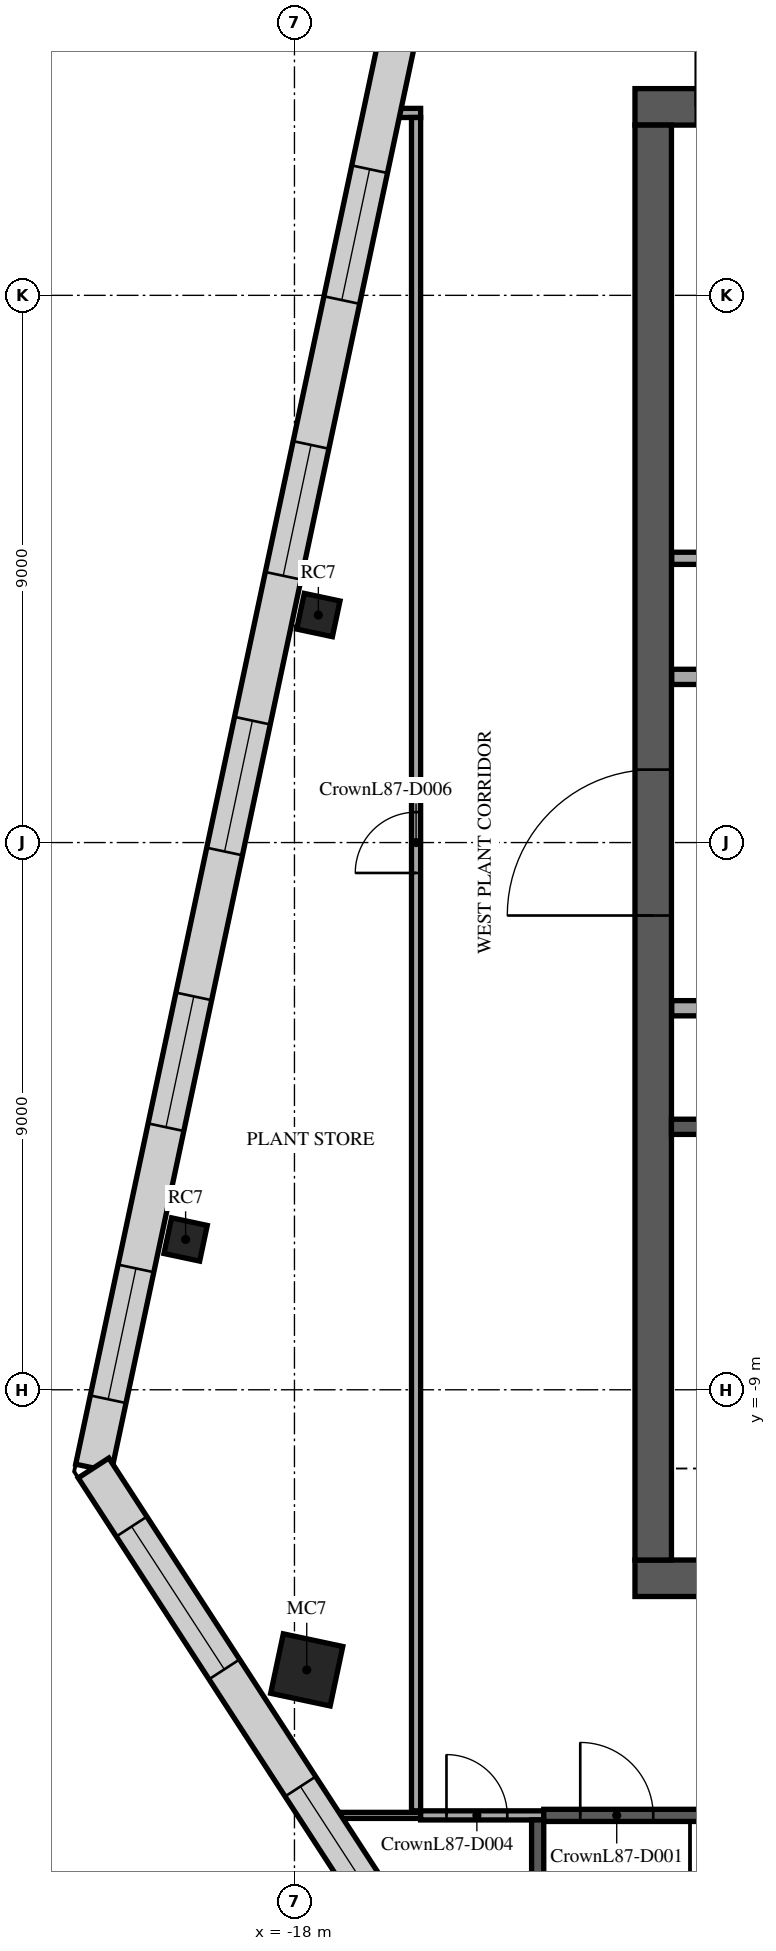
"""IFC4 building model, lengths in metres.
Left out: names, types, materials, properties, quantities, classifications, styles, units other than length and angle.
Written with IfcOpenShell. Run it as: python <this file> out.ifc"""

import sys

from ifc_helpers import new_model, si_unit, direction, frame, frame_2d, origin, origin_2d, place, context, subcontext, project, spatial, rectangle, extrude, element, fill, save


model = new_model("IFC4")
c1 = context("Model", 3, precision=1e-05, world=origin(), true_north=direction((0.0, 1.0)))
c2 = subcontext(c1, "Body", "Model", "MODEL_VIEW")
j1 = project(units=[si_unit("LENGTHUNIT", "METRE"), si_unit("PLANEANGLEUNIT", "RADIAN")], contexts=[c1])
p1 = place(None, origin())
s1 = spatial("IfcSite", under=j1, at=p1, CompositionType="ELEMENT")
p2 = place(p1, origin())
s2 = spatial("IfcBuilding", under=s1, at=p2, CompositionType="ELEMENT")
p3 = place(p2, frame((0.0, 0.0, 373.1)))
s3 = spatial("IfcBuildingStorey", under=s2, at=p3, CompositionType="ELEMENT", Elevation=373.1)
for number, where, z_axis, x_axis in (
    (1, (-17.607, 3.742, 0.0), (0.0, 0.0, 1.0), (0.208, 0.978, 0.0)),
    (2, (-19.79, -6.528, 0.0), (0.0, 0.0, 1.0), (0.208, 0.978, 0.0)),
):
    element("IfcColumn", number, at=place(p3, frame(where, z_axis=z_axis, x_axis=x_axis)), inside=s3, PredefinedType="COLUMN", context=c2, shape_type="SweptSolid", body=[
        extrude(rectangle(XDim=0.6, YDim=0.6, at=origin_2d()), origin(), (0.0, 0.0, 1.0), 3.5),
    ])
p4 = place(p3, frame((-17.798, -13.607, 0.0), z_axis=(0.0, 0.0, 1.0), x_axis=(0.207911690818, 0.978147600734, 0.0)))
e3 = element("IfcColumn", 3, at=p4, inside=s3, PredefinedType="COLUMN", context=c2, shape_type="SweptSolid", body=[
    extrude(rectangle(XDim=1.0, YDim=1.0, at=origin_2d()), origin(), (0.0, 0.0, 1.0), 3.5),
])
p5 = place(p3, frame((-12.4, 12.1, 0.0), z_axis=(0.0, 0.0, 1.0), x_axis=(1.0, 0.0, 0.0)))
e4 = element("IfcWall", 4, at=p5, inside=s3, PredefinedType="SHEAR", context=c2, shape_type="SweptSolid", body=[
    extrude(rectangle(XDim=24.8, YDim=0.6, at=frame_2d((12.4, 0.0))), origin(), (0.0, 0.0, 1.0), 3.2),
])
p6 = place(p5, frame((11.2, 0.0, 0.0)))
e5 = element("IfcOpeningElement", 5, at=p6, cuts=e4, PredefinedType="OPENING", context=c2, shape_type="SweptSolid", body=[
    extrude(rectangle(XDim=2.4, YDim=2.4, at=frame_2d((1.2, 1.2))), frame((0.0, 0.31, 0.0), z_axis=(0.0, -1.0, 0.0), x_axis=(1.0, 0.0, 0.0)), (0.0, 0.0, 1.0), 0.62),
])
p7 = place(p5, frame((22.025, 0.0, 0.0)))
e6 = element("IfcOpeningElement", 6, at=p7, cuts=e4, PredefinedType="OPENING", context=c2, shape_type="SweptSolid", body=[
    extrude(rectangle(XDim=1.2, YDim=2.1, at=frame_2d((0.6, 1.05))), frame((0.0, 0.31, 0.0), z_axis=(0.0, -1.0, 0.0), x_axis=(1.0, 0.0, 0.0)), (0.0, 0.0, 1.0), 0.62),
])
p8 = place(p5, frame((1.0, 0.0, 0.0)))
e7 = element("IfcOpeningElement", 7, at=p8, cuts=e4, PredefinedType="OPENING", context=c2, shape_type="SweptSolid", body=[
    extrude(rectangle(XDim=1.0, YDim=2.1, at=frame_2d((0.5, 1.05))), frame((0.0, 0.31, 0.0), z_axis=(0.0, -1.0, 0.0), x_axis=(1.0, 0.0, 0.0)), (0.0, 0.0, 1.0), 0.62),
])
p9 = place(p3, frame((-12.4, -12.1, 0.0), z_axis=(0.0, 0.0, 1.0), x_axis=(1.0, 0.0, 0.0)))
e8 = element("IfcWall", 8, at=p9, inside=s3, PredefinedType="SHEAR", context=c2, shape_type="SweptSolid", body=[
    extrude(rectangle(XDim=24.8, YDim=0.6, at=frame_2d((12.4, 0.0))), origin(), (0.0, 0.0, 1.0), 3.2),
])
p10 = place(p9, frame((7.3, 0.0, 0.0)))
e9 = element("IfcOpeningElement", 9, at=p10, cuts=e8, PredefinedType="OPENING", context=c2, shape_type="SweptSolid", body=[
    extrude(rectangle(XDim=2.0, YDim=2.1, at=frame_2d((1.0, 1.05))), frame((0.0, 0.31, 0.0), z_axis=(0.0, -1.0, 0.0), x_axis=(1.0, 0.0, 0.0)), (0.0, 0.0, 1.0), 0.62),
])
p11 = place(p9, frame((17.425, 0.0, 0.0)))
e10 = element("IfcOpeningElement", 10, at=p11, cuts=e8, PredefinedType="OPENING", context=c2, shape_type="SweptSolid", body=[
    extrude(rectangle(XDim=1.2, YDim=2.1, at=frame_2d((0.6, 1.05))), frame((0.0, 0.31, 0.0), z_axis=(0.0, -1.0, 0.0), x_axis=(1.0, 0.0, 0.0)), (0.0, 0.0, 1.0), 0.62),
])
p12 = place(p9, frame((1.575, 0.0, 0.0)))
e11 = element("IfcOpeningElement", 11, at=p12, cuts=e8, PredefinedType="OPENING", context=c2, shape_type="SweptSolid", body=[
    extrude(rectangle(XDim=1.2, YDim=2.1, at=frame_2d((0.6, 1.05))), frame((0.0, 0.31, 0.0), z_axis=(0.0, -1.0, 0.0), x_axis=(1.0, 0.0, 0.0)), (0.0, 0.0, 1.0), 0.62),
])
p13 = place(p9, frame((22.025, 0.0, 0.0)))
e12 = element("IfcOpeningElement", 12, at=p13, cuts=e8, PredefinedType="OPENING", context=c2, shape_type="SweptSolid", body=[
    extrude(rectangle(XDim=1.2, YDim=2.1, at=frame_2d((0.6, 1.05))), frame((0.0, 0.31, 0.0), z_axis=(0.0, -1.0, 0.0), x_axis=(1.0, 0.0, 0.0)), (0.0, 0.0, 1.0), 0.62),
])
p14 = place(p3, frame((-12.1, -11.8, 0.0), z_axis=(0.0, 0.0, 1.0), x_axis=(0.0, 1.0, 0.0)))
e13 = element("IfcWall", 13, at=p14, inside=s3, PredefinedType="SHEAR", context=c2, shape_type="SweptSolid", body=[
    extrude(rectangle(XDim=23.6, YDim=0.6, at=frame_2d((11.8, 0.0))), origin(), (0.0, 0.0, 1.0), 3.2),
])
p15 = place(p14, frame((10.6, 0.0, 0.0)))
e14 = element("IfcOpeningElement", 14, at=p15, cuts=e13, PredefinedType="OPENING", context=c2, shape_type="SweptSolid", body=[
    extrude(rectangle(XDim=2.4, YDim=2.4, at=frame_2d((1.2, 1.2))), frame((0.0, 0.31, 0.0), z_axis=(0.0, -1.0, 0.0), x_axis=(1.0, 0.0, 0.0)), (0.0, 0.0, 1.0), 0.62),
])
p16 = place(p3, frame((-8.65, -4.675, 0.0), z_axis=(0.0, 0.0, 1.0), x_axis=(-1.0, 0.0, 0.0)))
e15 = element("IfcWall", 15, at=p16, inside=s3, PredefinedType="SOLIDWALL", context=c2, shape_type="SweptSolid", body=[
    extrude(rectangle(XDim=3.15, YDim=0.25, at=frame_2d((1.575, 0.0))), origin(), (0.0, 0.0, 1.0), 3.2),
])
p17 = place(p3, frame((-11.795, -2.725, 0.0), z_axis=(0.0, 0.0, 1.0), x_axis=(1.0, 0.0, 0.0)))
e16 = element("IfcWall", 16, at=p17, inside=s3, PredefinedType="PARTITIONING", context=c2, shape_type="SweptSolid", body=[
    extrude(rectangle(XDim=14.415, YDim=0.25, at=frame_2d((7.208, 0.0))), origin(), (0.0, 0.0, 1.0), 3.2),
])
p18 = place(p17, frame((1.295, 0.0, 0.0)))
e17 = element("IfcOpeningElement", 17, at=p18, cuts=e16, PredefinedType="OPENING", context=c2, shape_type="SweptSolid", body=[
    extrude(rectangle(XDim=1.0, YDim=2.1, at=frame_2d((0.5, 1.05))), frame((0.0, 0.135, 0.0), z_axis=(0.0, -1.0, 0.0), x_axis=(1.0, 0.0, 0.0)), (0.0, 0.0, 1.0), 0.27),
])
p19 = place(p17, frame((4.42, 0.0, 0.0)))
e18 = element("IfcOpeningElement", 18, at=p19, cuts=e16, PredefinedType="OPENING", context=c2, shape_type="SweptSolid", body=[
    extrude(rectangle(XDim=1.0, YDim=2.1, at=frame_2d((0.5, 1.05))), frame((0.0, 0.135, 0.0), z_axis=(0.0, -1.0, 0.0), x_axis=(1.0, 0.0, 0.0)), (0.0, 0.0, 1.0), 0.27),
])
p20 = place(p17, frame((9.92, 0.0, 0.0)))
e19 = element("IfcOpeningElement", 19, at=p20, cuts=e16, PredefinedType="OPENING", context=c2, shape_type="SweptSolid", body=[
    extrude(rectangle(XDim=1.0, YDim=2.1, at=frame_2d((0.5, 1.05))), frame((0.0, 0.135, 0.0), z_axis=(0.0, -1.0, 0.0), x_axis=(1.0, 0.0, 0.0)), (0.0, 0.0, 1.0), 0.27),
])
p21 = place(p3, frame((-11.795, 2.725, 0.0), z_axis=(0.0, 0.0, 1.0), x_axis=(1.0, 0.0, 0.0)))
e20 = element("IfcWall", 20, at=p21, inside=s3, PredefinedType="PARTITIONING", context=c2, shape_type="SweptSolid", body=[
    extrude(rectangle(XDim=23.59, YDim=0.25, at=frame_2d((11.795, 0.0))), origin(), (0.0, 0.0, 1.0), 3.2),
])
p22 = place(p21, frame((21.345, 0.0, 0.0)))
e21 = element("IfcOpeningElement", 21, at=p22, cuts=e20, PredefinedType="OPENING", context=c2, shape_type="SweptSolid", body=[
    extrude(rectangle(XDim=0.9, YDim=2.1, at=frame_2d((0.45, 1.05))), frame((0.0, 0.135, 0.0), z_axis=(0.0, -1.0, 0.0), x_axis=(1.0, 0.0, 0.0)), (0.0, 0.0, 1.0), 0.27),
])
p23 = place(p21, frame((1.345, 0.0, 0.0)))
e22 = element("IfcOpeningElement", 22, at=p23, cuts=e20, PredefinedType="OPENING", context=c2, shape_type="SweptSolid", body=[
    extrude(rectangle(XDim=0.9, YDim=2.1, at=frame_2d((0.45, 1.05))), frame((0.0, 0.135, 0.0), z_axis=(0.0, -1.0, 0.0), x_axis=(1.0, 0.0, 0.0)), (0.0, 0.0, 1.0), 0.27),
])
p24 = place(p21, frame((4.42, 0.0, 0.0)))
e23 = element("IfcOpeningElement", 23, at=p24, cuts=e20, PredefinedType="OPENING", context=c2, shape_type="SweptSolid", body=[
    extrude(rectangle(XDim=1.0, YDim=2.1, at=frame_2d((0.5, 1.05))), frame((0.0, 0.135, 0.0), z_axis=(0.0, -1.0, 0.0), x_axis=(1.0, 0.0, 0.0)), (0.0, 0.0, 1.0), 0.27),
])
p25 = place(p21, frame((7.17, 0.0, 0.0)))
e24 = element("IfcOpeningElement", 24, at=p25, cuts=e20, PredefinedType="OPENING", context=c2, shape_type="SweptSolid", body=[
    extrude(rectangle(XDim=1.0, YDim=2.1, at=frame_2d((0.5, 1.05))), frame((0.0, 0.135, 0.0), z_axis=(0.0, -1.0, 0.0), x_axis=(1.0, 0.0, 0.0)), (0.0, 0.0, 1.0), 0.27),
])
p26 = place(p21, frame((12.57, 0.0, 0.0)))
e25 = element("IfcOpeningElement", 25, at=p26, cuts=e20, PredefinedType="OPENING", context=c2, shape_type="SweptSolid", body=[
    extrude(rectangle(XDim=1.2, YDim=2.1, at=frame_2d((0.6, 1.05))), frame((0.0, 0.135, 0.0), z_axis=(0.0, -1.0, 0.0), x_axis=(1.0, 0.0, 0.0)), (0.0, 0.0, 1.0), 0.27),
])
p27 = place(p3, frame((-11.795, 4.675, 0.0), z_axis=(0.0, 0.0, 1.0), x_axis=(1.0, 0.0, 0.0)))
e26 = element("IfcWall", 26, at=p27, inside=s3, PredefinedType="PARTITIONING", context=c2, shape_type="SweptSolid", body=[
    extrude(rectangle(XDim=3.645, YDim=0.2, at=frame_2d((1.823, 0.0))), origin(), (0.0, 0.0, 1.0), 3.2),
])
p28 = place(p3, frame((-17.475, -16.0, 0.0), z_axis=(0.0, 0.0, 1.0), x_axis=(1.0, 0.0, 0.0)))
e27 = element("IfcWall", 27, at=p28, inside=s3, PredefinedType="PARTITIONING", context=c2, shape_type="SweptSolid", body=[
    extrude(rectangle(XDim=1.55, YDim=0.1, at=frame_2d((0.775, 0.0))), origin(), (0.0, 0.0, 1.0), 3.2),
])
p29 = place(p3, frame((-15.925, -16.0, 0.0), z_axis=(0.0, 0.0, 1.0), x_axis=(1.0, 0.0, 0.0)))
e28 = element("IfcWall", 28, at=p29, inside=s3, PredefinedType="PARTITIONING", context=c2, shape_type="SweptSolid", body=[
    extrude(rectangle(XDim=2.025, YDim=0.15, at=frame_2d((1.013, 0.0))), origin(), (0.0, 0.0, 1.0), 3.2),
])
p30 = place(p29, frame((0.425, 0.0, 0.0)))
e29 = element("IfcOpeningElement", 29, at=p30, cuts=e28, PredefinedType="OPENING", context=c2, shape_type="SweptSolid", body=[
    extrude(rectangle(XDim=1.0, YDim=2.1, at=frame_2d((0.5, 1.05))), frame((0.0, 0.085, 0.0), z_axis=(0.0, -1.0, 0.0), x_axis=(1.0, 0.0, 0.0)), (0.0, 0.0, 1.0), 0.17),
])
p31 = place(p3, frame((-13.9, -16.0, 0.0), z_axis=(0.0, 0.0, 1.0), x_axis=(1.0, 0.0, 0.0)))
e30 = element("IfcWall", 30, at=p31, inside=s3, PredefinedType="PARTITIONING", context=c2, shape_type="SweptSolid", body=[
    extrude(rectangle(XDim=9.0, YDim=0.2, at=frame_2d((4.5, 0.0))), origin(), (0.0, 0.0, 1.0), 3.2),
])
p32 = place(p31, frame((0.6, 0.0, 0.0)))
e31 = element("IfcOpeningElement", 31, at=p32, cuts=e30, PredefinedType="OPENING", context=c2, shape_type="SweptSolid", body=[
    extrude(rectangle(XDim=1.2, YDim=2.1, at=frame_2d((0.6, 1.05))), frame((0.0, 0.11, 0.0), z_axis=(0.0, -1.0, 0.0), x_axis=(1.0, 0.0, 0.0)), (0.0, 0.0, 1.0), 0.22),
])
p33 = place(p3, frame((-16.465, 12.0, 0.0), z_axis=(0.0, 0.0, 1.0), x_axis=(1.0, 0.0, 0.0)))
e32 = element("IfcWall", 32, at=p33, inside=s3, PredefinedType="PARTITIONING", context=c2, shape_type="SweptSolid", body=[
    extrude(rectangle(XDim=0.54, YDim=0.15, at=frame_2d((0.27, 0.0))), origin(), (0.0, 0.0, 1.0), 3.2),
])
p34 = place(p3, frame((-16.0, -15.925, 0.0), z_axis=(0.0, 0.0, 1.0), x_axis=(0.0, 1.0, 0.0)))
e33 = element("IfcWall", 33, at=p34, inside=s3, PredefinedType="PARTITIONING", context=c2, shape_type="SweptSolid", body=[
    extrude(rectangle(XDim=27.85, YDim=0.15, at=frame_2d((13.925, 0.0))), origin(), (0.0, 0.0, 1.0), 2.63),
])
p35 = place(p34, frame((15.425, 0.0, 0.0)))
e34 = element("IfcOpeningElement", 34, at=p35, cuts=e33, PredefinedType="OPENING", context=c2, shape_type="SweptSolid", body=[
    extrude(rectangle(XDim=1.0, YDim=2.1, at=frame_2d((0.5, 1.05))), frame((0.0, 0.085, 0.0), z_axis=(0.0, -1.0, 0.0), x_axis=(1.0, 0.0, 0.0)), (0.0, 0.0, 1.0), 0.17),
])
p36 = place(p3, frame((-14.0, -19.107, 0.0), z_axis=(0.0, 0.0, 1.0), x_axis=(0.0, 1.0, 0.0)))
e35 = element("IfcWall", 35, at=p36, inside=s3, PredefinedType="PARTITIONING", context=c2, shape_type="SweptSolid", body=[
    extrude(rectangle(XDim=3.032, YDim=0.2, at=frame_2d((1.516, 0.0))), origin(), (0.0, 0.0, 1.0), 2.63),
])
p37 = place(p3, frame((-15.573, 16.679, 0.0), z_axis=(0.0, 0.0, 1.0), x_axis=(-0.207912773383, -0.978147370627, 0.0)))
e36 = element("IfcWall", 36, at=p37, inside=s3, PredefinedType="STANDARD", context=c2, shape_type="SweptSolid", body=[
    extrude(rectangle(XDim=27.568, YDim=0.6, at=frame_2d((13.784, 0.0))), origin(), (0.0, 0.0, 1.0), 3.2),
])
p38 = place(p37, frame((1.156, 0.0, 0.6)))
e37 = element("IfcOpeningElement", 37, at=p38, cuts=e36, PredefinedType="OPENING", context=c2, shape_type="SweptSolid", body=[
    extrude(rectangle(XDim=2.2, YDim=1.85, at=frame_2d((1.1, 0.925))), frame((0.0, 0.31, 0.0), z_axis=(0.0, -1.0, 0.0), x_axis=(1.0, 0.0, 0.0)), (0.0, 0.0, 1.0), 0.62),
])
p39 = place(p37, frame((5.73, 0.0, 0.6)))
e38 = element("IfcOpeningElement", 38, at=p39, cuts=e36, PredefinedType="OPENING", context=c2, shape_type="SweptSolid", body=[
    extrude(rectangle(XDim=2.2, YDim=1.85, at=frame_2d((1.1, 0.925))), frame((0.0, 0.31, 0.0), z_axis=(0.0, -1.0, 0.0), x_axis=(1.0, 0.0, 0.0)), (0.0, 0.0, 1.0), 0.62),
])
p40 = place(p37, frame((10.366, 0.0, 0.6)))
e39 = element("IfcOpeningElement", 39, at=p40, cuts=e36, PredefinedType="OPENING", context=c2, shape_type="SweptSolid", body=[
    extrude(rectangle(XDim=2.2, YDim=1.85, at=frame_2d((1.1, 0.925))), frame((0.0, 0.31, 0.0), z_axis=(0.0, -1.0, 0.0), x_axis=(1.0, 0.0, 0.0)), (0.0, 0.0, 1.0), 0.62),
])
p41 = place(p37, frame((15.002, 0.0, 0.6)))
e40 = element("IfcOpeningElement", 40, at=p41, cuts=e36, PredefinedType="OPENING", context=c2, shape_type="SweptSolid", body=[
    extrude(rectangle(XDim=2.2, YDim=1.85, at=frame_2d((1.1, 0.925))), frame((0.0, 0.31, 0.0), z_axis=(0.0, -1.0, 0.0), x_axis=(1.0, 0.0, 0.0)), (0.0, 0.0, 1.0), 0.62),
])
p42 = place(p37, frame((19.638, 0.0, 0.6)))
e41 = element("IfcOpeningElement", 41, at=p42, cuts=e36, PredefinedType="OPENING", context=c2, shape_type="SweptSolid", body=[
    extrude(rectangle(XDim=2.2, YDim=1.85, at=frame_2d((1.1, 0.925))), frame((0.0, 0.31, 0.0), z_axis=(0.0, -1.0, 0.0), x_axis=(1.0, 0.0, 0.0)), (0.0, 0.0, 1.0), 0.62),
])
p43 = place(p37, frame((24.212, 0.0, 0.6)))
e42 = element("IfcOpeningElement", 42, at=p43, cuts=e36, PredefinedType="OPENING", context=c2, shape_type="SweptSolid", body=[
    extrude(rectangle(XDim=2.2, YDim=1.85, at=frame_2d((1.1, 0.925))), frame((0.0, 0.31, 0.0), z_axis=(0.0, -1.0, 0.0), x_axis=(1.0, 0.0, 0.0)), (0.0, 0.0, 1.0), 0.62),
])
p44 = place(p3, frame((-21.304, -10.286, 0.0), z_axis=(0.0, 0.0, 1.0), x_axis=(0.544646568575, -0.838665675546, 0.0)))
e43 = element("IfcWall", 43, at=p44, inside=s3, PredefinedType="STANDARD", context=c2, shape_type="SweptSolid", body=[
    extrude(rectangle(XDim=10.195, YDim=0.6, at=frame_2d((5.098, 0.0))), origin(), (0.0, 0.0, 1.0), 3.2),
])
p45 = place(p44, frame((1.149, 0.0, 0.6)))
e44 = element("IfcOpeningElement", 44, at=p45, cuts=e43, PredefinedType="OPENING", context=c2, shape_type="SweptSolid", body=[
    extrude(rectangle(XDim=2.8, YDim=1.85, at=frame_2d((1.4, 0.925))), frame((0.0, 0.31, 0.0), z_axis=(0.0, -1.0, 0.0), x_axis=(1.0, 0.0, 0.0)), (0.0, 0.0, 1.0), 0.62),
])
p46 = place(p44, frame((6.246, 0.0, 0.6)))
e45 = element("IfcOpeningElement", 45, at=p46, cuts=e43, PredefinedType="OPENING", context=c2, shape_type="SweptSolid", body=[
    extrude(rectangle(XDim=2.8, YDim=1.85, at=frame_2d((1.4, 0.925))), frame((0.0, 0.31, 0.0), z_axis=(0.0, -1.0, 0.0), x_axis=(1.0, 0.0, 0.0)), (0.0, 0.0, 1.0), 0.62),
])
p47 = place(p15, origin())
e46 = element("IfcDoor", 46, at=p47, inside=s3, OperationType="SINGLE_SWING_LEFT", PredefinedType="DOOR", context=c2, shape_type="SweptSolid", body=[
    extrude(rectangle(XDim=2.4, YDim=2.4, at=frame_2d((1.2, 1.2))), frame((0.0, 0.025, 0.0), z_axis=(0.0, -1.0, 0.0), x_axis=(1.0, 0.0, 0.0)), (0.0, 0.0, 1.0), 0.05),
])
fill(e14, e46)
p48 = place(p32, frame((1.2, 0.0, 0.0), z_axis=(0.0, 0.0, 1.0), x_axis=(-1.0, 0.0, 0.0)))
e47 = element("IfcDoor", 47, at=p48, inside=s3, OperationType="SINGLE_SWING_LEFT", PredefinedType="DOOR", context=c2, shape_type="SweptSolid", body=[
    extrude(rectangle(XDim=1.2, YDim=2.1, at=frame_2d((0.6, 1.05))), frame((0.0, 0.025, 0.0), z_axis=(0.0, -1.0, 0.0), x_axis=(1.0, 0.0, 0.0)), (0.0, 0.0, 1.0), 0.05),
])
fill(e31, e47)
p49 = place(p30, origin())
e48 = element("IfcDoor", 48, at=p49, inside=s3, OperationType="SINGLE_SWING_RIGHT", PredefinedType="DOOR", context=c2, shape_type="SweptSolid", body=[
    extrude(rectangle(XDim=1.0, YDim=2.1, at=frame_2d((0.5, 1.05))), frame((0.0, 0.025, 0.0), z_axis=(0.0, -1.0, 0.0), x_axis=(1.0, 0.0, 0.0)), (0.0, 0.0, 1.0), 0.05),
])
fill(e29, e48)
p50 = place(p35, origin())
e49 = element("IfcDoor", 49, at=p50, inside=s3, OperationType="SINGLE_SWING_RIGHT", PredefinedType="DOOR", context=c2, shape_type="SweptSolid", body=[
    extrude(rectangle(XDim=1.0, YDim=2.1, at=frame_2d((0.5, 1.05))), frame((0.0, 0.025, 0.0), z_axis=(0.0, -1.0, 0.0), x_axis=(1.0, 0.0, 0.0)), (0.0, 0.0, 1.0), 0.05),
])
fill(e34, e49)
p51 = place(p39, origin())
e50 = element("IfcWindow", 50, at=p51, inside=s3, PartitioningType="SINGLE_PANEL", PredefinedType="USERDEFINED", context=c2, shape_type="SweptSolid", body=[
    extrude(rectangle(XDim=2.2, YDim=1.85, at=frame_2d((1.1, 0.925))), frame((0.0, 0.03, 0.0), z_axis=(0.0, -1.0, 0.0), x_axis=(1.0, 0.0, 0.0)), (0.0, 0.0, 1.0), 0.06),
])
fill(e38, e50)
p52 = place(p40, origin())
e51 = element("IfcWindow", 51, at=p52, inside=s3, PartitioningType="SINGLE_PANEL", PredefinedType="USERDEFINED", context=c2, shape_type="SweptSolid", body=[
    extrude(rectangle(XDim=2.2, YDim=1.85, at=frame_2d((1.1, 0.925))), frame((0.0, 0.03, 0.0), z_axis=(0.0, -1.0, 0.0), x_axis=(1.0, 0.0, 0.0)), (0.0, 0.0, 1.0), 0.06),
])
fill(e39, e51)
p53 = place(p41, origin())
e52 = element("IfcWindow", 52, at=p53, inside=s3, PartitioningType="SINGLE_PANEL", PredefinedType="USERDEFINED", context=c2, shape_type="SweptSolid", body=[
    extrude(rectangle(XDim=2.2, YDim=1.85, at=frame_2d((1.1, 0.925))), frame((0.0, 0.03, 0.0), z_axis=(0.0, -1.0, 0.0), x_axis=(1.0, 0.0, 0.0)), (0.0, 0.0, 1.0), 0.06),
])
fill(e40, e52)
p54 = place(p42, origin())
e53 = element("IfcWindow", 53, at=p54, inside=s3, PartitioningType="SINGLE_PANEL", PredefinedType="USERDEFINED", context=c2, shape_type="SweptSolid", body=[
    extrude(rectangle(XDim=2.2, YDim=1.85, at=frame_2d((1.1, 0.925))), frame((0.0, 0.03, 0.0), z_axis=(0.0, -1.0, 0.0), x_axis=(1.0, 0.0, 0.0)), (0.0, 0.0, 1.0), 0.06),
])
fill(e41, e53)
p55 = place(p43, origin())
e54 = element("IfcWindow", 54, at=p55, inside=s3, PartitioningType="SINGLE_PANEL", PredefinedType="USERDEFINED", context=c2, shape_type="SweptSolid", body=[
    extrude(rectangle(XDim=2.2, YDim=1.85, at=frame_2d((1.1, 0.925))), frame((0.0, 0.03, 0.0), z_axis=(0.0, -1.0, 0.0), x_axis=(1.0, 0.0, 0.0)), (0.0, 0.0, 1.0), 0.06),
])
fill(e42, e54)
p56 = place(p45, origin())
e55 = element("IfcWindow", 55, at=p56, inside=s3, PartitioningType="SINGLE_PANEL", PredefinedType="USERDEFINED", context=c2, shape_type="SweptSolid", body=[
    extrude(rectangle(XDim=2.8, YDim=1.85, at=frame_2d((1.4, 0.925))), frame((0.0, 0.03, 0.0), z_axis=(0.0, -1.0, 0.0), x_axis=(1.0, 0.0, 0.0)), (0.0, 0.0, 1.0), 0.06),
])
fill(e44, e55)
p57 = place(p46, origin())
e56 = element("IfcWindow", 56, at=p57, inside=s3, PartitioningType="SINGLE_PANEL", PredefinedType="USERDEFINED", context=c2, shape_type="SweptSolid", body=[
    extrude(rectangle(XDim=2.8, YDim=1.85, at=frame_2d((1.4, 0.925))), frame((0.0, 0.03, 0.0), z_axis=(0.0, -1.0, 0.0), x_axis=(1.0, 0.0, 0.0)), (0.0, 0.0, 1.0), 0.06),
])
fill(e45, e56)
save(model, sys.argv[1])
